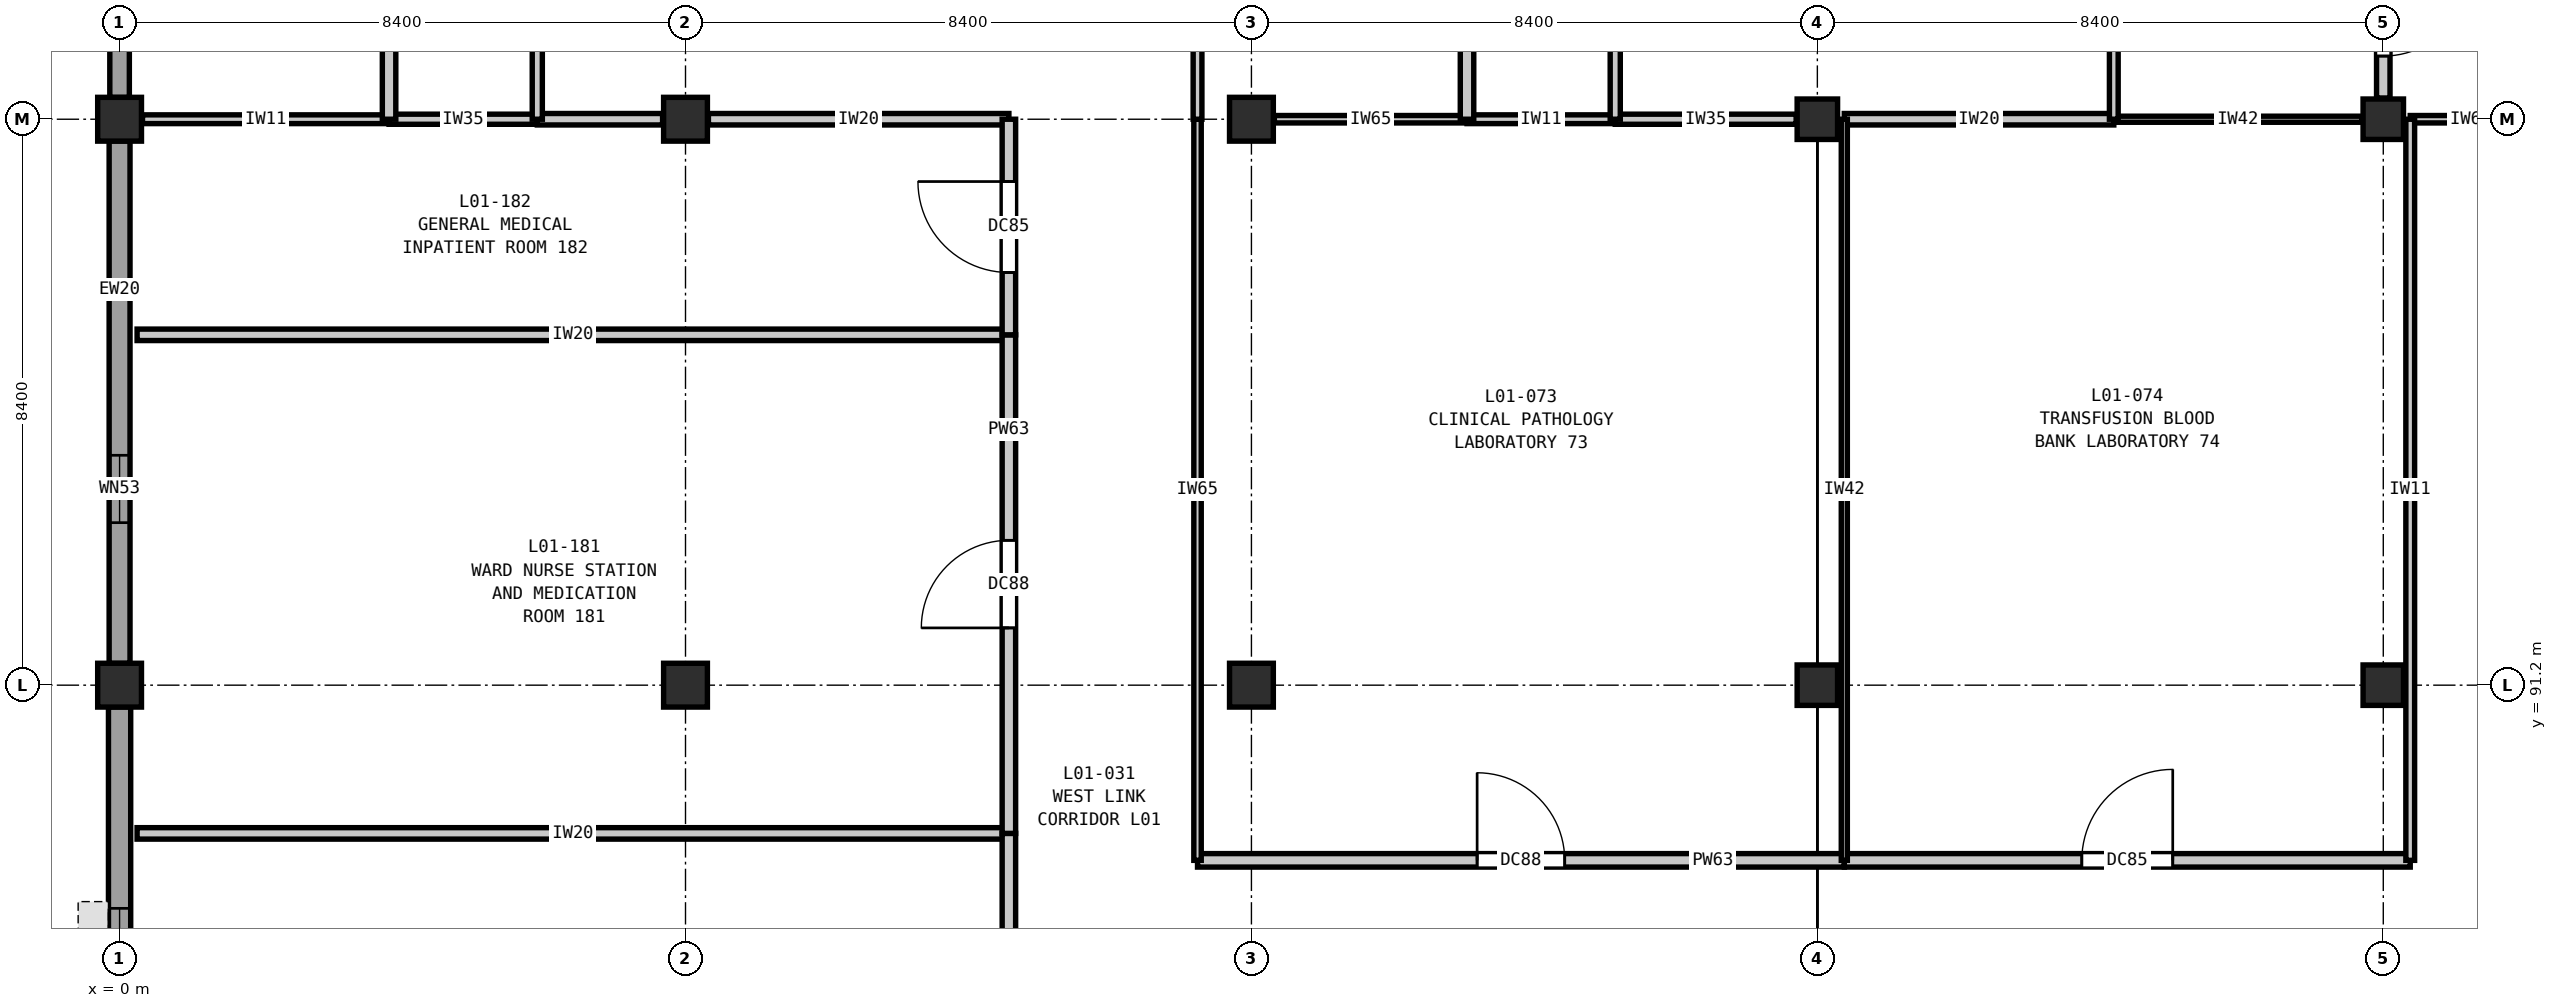
"""IFC4 building model, lengths in metres.
Left out: names, types, materials, properties, quantities, classifications, styles, units other than length and angle.
Written with IfcOpenShell. Run it as: python <this file> out.ifc"""

import sys

from ifc_helpers import new_model, si_unit, direction, frame, frame_2d, origin, origin_2d, place, context, subcontext, project, spatial, rectangle, extrude, element, fill, save


model = new_model("IFC4")
c1 = context("Model", 3, precision=1e-05, world=origin(), true_north=direction((0.0, 1.0)))
c2 = subcontext(c1, "Body", "Model", "MODEL_VIEW")
j1 = project(units=[si_unit("LENGTHUNIT", "METRE"), si_unit("PLANEANGLEUNIT", "RADIAN")], contexts=[c1])
p1 = place(None, origin())
s1 = spatial("IfcSite", under=j1, at=p1, CompositionType="ELEMENT")
p2 = place(p1, origin())
s2 = spatial("IfcBuilding", under=s1, at=p2, CompositionType="ELEMENT")
p3 = place(p2, frame((0.0, 0.0, 5.4)))
s3 = spatial("IfcBuildingStorey", under=s2, at=p3, CompositionType="ELEMENT", Elevation=5.4)
for number, where, z_axis, x_axis in (
    (1, (0.0, 91.2, 0.0), (0.0, 0.0, 1.0), (1.0, 0.0, 0.0)),
    (2, (0.0, 99.6, 0.0), (0.0, 0.0, 1.0), (1.0, 0.0, 0.0)),
    (3, (8.4, 91.2, 0.0), (0.0, 0.0, 1.0), (1.0, 0.0, 0.0)),
    (4, (8.4, 99.6, 0.0), (0.0, 0.0, 1.0), (1.0, 0.0, 0.0)),
    (5, (16.8, 91.2, 0.0), (0.0, 0.0, 1.0), (1.0, 0.0, 0.0)),
    (6, (16.8, 99.6, 0.0), (0.0, 0.0, 1.0), (1.0, 0.0, 0.0)),
):
    element("IfcColumn", number, at=place(p3, frame(where, z_axis=z_axis, x_axis=x_axis)), inside=s3, PredefinedType="COLUMN", context=c2, shape_type="SweptSolid", body=[
        extrude(rectangle(XDim=0.65, YDim=0.65, at=origin_2d()), origin(), (0.0, 0.0, 1.0), 5.4),
    ])
for number, where, z_axis, x_axis in (
    (7, (25.2, 91.2, 0.0), (0.0, 0.0, 1.0), (1.0, 0.0, 0.0)),
    (8, (25.2, 99.6, 0.0), (0.0, 0.0, 1.0), (1.0, 0.0, 0.0)),
    (9, (33.6, 91.2, 0.0), (0.0, 0.0, 1.0), (1.0, 0.0, 0.0)),
    (10, (33.6, 99.6, 0.0), (0.0, 0.0, 1.0), (1.0, 0.0, 0.0)),
):
    element("IfcColumn", number, at=place(p3, frame(where, z_axis=z_axis, x_axis=x_axis)), inside=s3, PredefinedType="COLUMN", context=c2, shape_type="SweptSolid", body=[
        extrude(rectangle(XDim=0.6, YDim=0.6, at=origin_2d()), origin(), (0.0, 0.0, 1.0), 5.4),
    ])
p4 = place(p3, frame((0.0, 83.098, 0.0), z_axis=(0.0, 0.0, 1.0), x_axis=(0.0, 1.0, 0.0)))
e11 = element("IfcWall", 11, at=p4, inside=s3, PredefinedType="SOLIDWALL", context=c2, shape_type="SweptSolid", body=[
    extrude(rectangle(XDim=7.779, YDim=0.33, at=frame_2d((3.89, 0.0))), origin(), (0.0, 0.0, 1.0), 4.68),
])
p5 = place(p4, frame((2.99, 0.0, 0.9)))
e12 = element("IfcOpeningElement", 12, at=p5, cuts=e11, PredefinedType="OPENING", context=c2, shape_type="SweptSolid", body=[
    extrude(rectangle(XDim=1.8, YDim=1.55, at=frame_2d((0.9, 0.775))), frame((0.0, 0.175, 0.0), z_axis=(0.0, -1.0, 0.0), x_axis=(1.0, 0.0, 0.0)), (0.0, 0.0, 1.0), 0.35),
])
p6 = place(p3, frame((0.0, 91.523, 0.0), z_axis=(0.0, 0.0, 1.0), x_axis=(0.0, 1.0, 0.0)))
e13 = element("IfcWall", 13, at=p6, inside=s3, PredefinedType="SOLIDWALL", context=c2, shape_type="SweptSolid", body=[
    extrude(rectangle(XDim=7.754, YDim=0.31, at=frame_2d((3.877, 0.0))), origin(), (0.0, 0.0, 1.0), 4.68),
])
p7 = place(p6, frame((2.089, 0.0, 0.9)))
e14 = element("IfcOpeningElement", 14, at=p7, cuts=e13, PredefinedType="OPENING", context=c2, shape_type="SweptSolid", body=[
    extrude(rectangle(XDim=1.0, YDim=1.75, at=frame_2d((0.5, 0.875))), frame((0.0, 0.165, 0.0), z_axis=(0.0, -1.0, 0.0), x_axis=(1.0, 0.0, 0.0)), (0.0, 0.0, 1.0), 0.33),
])
p8 = place(p3, frame((0.0, 99.923, 0.0), z_axis=(0.0, 0.0, 1.0), x_axis=(0.0, 1.0, 0.0)))
e15 = element("IfcWall", 15, at=p8, inside=s3, PredefinedType="SOLIDWALL", context=c2, shape_type="SweptSolid", body=[
    extrude(rectangle(XDim=2.554, YDim=0.29, at=frame_2d((1.277, 0.0))), origin(), (0.0, 0.0, 1.0), 4.68),
])
p9 = place(p3, frame((16.0, 88.6, 0.0), z_axis=(0.0, 0.0, 1.0), x_axis=(1.0, 0.0, 0.0)))
e16 = element("IfcWall", 16, at=p9, inside=s3, PredefinedType="PARTITIONING", context=c2, shape_type="SweptSolid", body=[
    extrude(rectangle(XDim=9.6, YDim=0.2, at=frame_2d((4.8, 0.0))), origin(), (0.0, 0.0, 1.0), 5.05),
])
p10 = place(p9, frame((4.15, 0.0, 0.0)))
e17 = element("IfcOpeningElement", 17, at=p10, cuts=e16, PredefinedType="OPENING", context=c2, shape_type="SweptSolid", body=[
    extrude(rectangle(XDim=1.3, YDim=2.2, at=frame_2d((0.65, 1.1))), frame((0.0, 0.11, 0.0), z_axis=(0.0, -1.0, 0.0), x_axis=(1.0, 0.0, 0.0)), (0.0, 0.0, 1.0), 0.22),
])
p11 = place(p3, frame((25.6, 88.6, 0.0), z_axis=(0.0, 0.0, 1.0), x_axis=(1.0, 0.0, 0.0)))
e18 = element("IfcWall", 18, at=p11, inside=s3, PredefinedType="PARTITIONING", context=c2, shape_type="SweptSolid", body=[
    extrude(rectangle(XDim=8.4, YDim=0.2, at=frame_2d((4.2, 0.0))), origin(), (0.0, 0.0, 1.0), 5.05),
])
p12 = place(p11, frame((3.525, 0.0, 0.0)))
e19 = element("IfcOpeningElement", 19, at=p12, cuts=e18, PredefinedType="OPENING", context=c2, shape_type="SweptSolid", body=[
    extrude(rectangle(XDim=1.35, YDim=2.2, at=frame_2d((0.675, 1.1))), frame((0.0, 0.11, 0.0), z_axis=(0.0, -1.0, 0.0), x_axis=(1.0, 0.0, 0.0)), (0.0, 0.0, 1.0), 0.22),
])
for number, where, z_axis, x_axis in (
    (20, (0.26, 89.0, 0.0), (0.0, 0.0, 1.0), (1.0, 0.0, 0.0)),
    (21, (0.26, 96.4, 0.0), (0.0, 0.0, 1.0), (1.0, 0.0, 0.0)),
):
    element("IfcWall", number, at=place(p3, frame(where, z_axis=z_axis, x_axis=x_axis)), inside=s3, PredefinedType="PARTITIONING", context=c2, shape_type="SweptSolid", body=[
        extrude(rectangle(XDim=12.94, YDim=0.17, at=frame_2d((6.47, 0.0))), origin(), (0.0, 0.0, 1.0), 5.05),
    ])
p13 = place(p3, frame((0.34, 99.6, 0.0), z_axis=(0.0, 0.0, 1.0), x_axis=(1.0, 0.0, 0.0)))
e22 = element("IfcWall", 22, at=p13, inside=s3, PredefinedType="PARTITIONING", context=c2, shape_type="SweptSolid", body=[
    extrude(rectangle(XDim=3.66, YDim=0.13, at=frame_2d((1.83, 0.0))), origin(), (0.0, 0.0, 1.0), 4.685),
])
p14 = place(p3, frame((4.0, 99.6, 0.0), z_axis=(0.0, 0.0, 1.0), x_axis=(1.0, 0.0, 0.0)))
e23 = element("IfcWall", 23, at=p14, inside=s3, PredefinedType="PARTITIONING", context=c2, shape_type="SweptSolid", body=[
    extrude(rectangle(XDim=2.2, YDim=0.15, at=frame_2d((1.1, 0.0))), origin(), (0.0, 0.0, 1.0), 4.685),
])
p15 = place(p3, frame((8.74, 99.6, 0.0), z_axis=(0.0, 0.0, 1.0), x_axis=(1.0, 0.0, 0.0)))
e24 = element("IfcWall", 24, at=p15, inside=s3, PredefinedType="PARTITIONING", context=c2, shape_type="SweptSolid", body=[
    extrude(rectangle(XDim=4.46, YDim=0.17, at=frame_2d((2.23, 0.0))), origin(), (0.0, 0.0, 1.0), 4.685),
])
p16 = place(p3, frame((6.2, 99.6, 0.0), z_axis=(0.0, 0.0, 1.0), x_axis=(1.0, 0.0, 0.0)))
e25 = element("IfcWall", 25, at=p16, inside=s3, PredefinedType="PARTITIONING", context=c2, shape_type="SweptSolid", body=[
    extrude(rectangle(XDim=1.86, YDim=0.17, at=frame_2d((0.93, 0.0))), origin(), (0.0, 0.0, 1.0), 4.685),
])
p17 = place(p3, frame((17.14, 99.6, 0.0), z_axis=(0.0, 0.0, 1.0), x_axis=(1.0, 0.0, 0.0)))
e26 = element("IfcWall", 26, at=p17, inside=s3, PredefinedType="PARTITIONING", context=c2, shape_type="SweptSolid", body=[
    extrude(rectangle(XDim=2.86, YDim=0.11, at=frame_2d((1.43, 0.0))), origin(), (0.0, 0.0, 1.0), 4.685),
])
p18 = place(p3, frame((20.0, 99.6, 0.0), z_axis=(0.0, 0.0, 1.0), x_axis=(1.0, 0.0, 0.0)))
e27 = element("IfcWall", 27, at=p18, inside=s3, PredefinedType="PARTITIONING", context=c2, shape_type="SweptSolid", body=[
    extrude(rectangle(XDim=2.2, YDim=0.13, at=frame_2d((1.1, 0.0))), origin(), (0.0, 0.0, 1.0), 4.685),
])
p19 = place(p3, frame((22.2, 99.6, 0.0), z_axis=(0.0, 0.0, 1.0), x_axis=(1.0, 0.0, 0.0)))
e28 = element("IfcWall", 28, at=p19, inside=s3, PredefinedType="PARTITIONING", context=c2, shape_type="SweptSolid", body=[
    extrude(rectangle(XDim=2.685, YDim=0.15, at=frame_2d((1.343, 0.0))), origin(), (0.0, 0.0, 1.0), 4.685),
])
p20 = place(p3, frame((25.6, 99.6, 0.0), z_axis=(0.0, 0.0, 1.0), x_axis=(1.0, 0.0, 0.0)))
e29 = element("IfcWall", 29, at=p20, inside=s3, PredefinedType="PARTITIONING", context=c2, shape_type="SweptSolid", body=[
    extrude(rectangle(XDim=4.0, YDim=0.17, at=frame_2d((2.0, 0.0))), origin(), (0.0, 0.0, 1.0), 4.685),
])
p21 = place(p3, frame((29.6, 99.6, 0.0), z_axis=(0.0, 0.0, 1.0), x_axis=(1.0, 0.0, 0.0)))
e30 = element("IfcWall", 30, at=p21, inside=s3, PredefinedType="PARTITIONING", context=c2, shape_type="SweptSolid", body=[
    extrude(rectangle(XDim=3.685, YDim=0.09, at=frame_2d((1.842, 0.0))), origin(), (0.0, 0.0, 1.0), 4.685),
])
p22 = place(p3, frame((34.0, 99.6, 0.0), z_axis=(0.0, 0.0, 1.0), x_axis=(1.0, 0.0, 0.0)))
e31 = element("IfcWall", 31, at=p22, inside=s3, PredefinedType="PARTITIONING", context=c2, shape_type="SweptSolid", body=[
    extrude(rectangle(XDim=1.8, YDim=0.11, at=frame_2d((0.9, 0.0))), origin(), (0.0, 0.0, 1.0), 4.685),
])
p23 = place(p3, frame((4.0, 99.6, 0.0), z_axis=(0.0, 0.0, 1.0), x_axis=(0.0, 1.0, 0.0)))
e32 = element("IfcWall", 32, at=p23, inside=s3, PredefinedType="PARTITIONING", context=c2, shape_type="SweptSolid", body=[
    extrude(rectangle(XDim=6.8, YDim=0.2, at=frame_2d((3.4, 0.0))), origin(), (0.0, 0.0, 1.0), 5.05),
])
p24 = place(p23, frame((2.475, 0.0, 0.0)))
e33 = element("IfcOpeningElement", 33, at=p24, cuts=e32, PredefinedType="OPENING", context=c2, shape_type="SweptSolid", body=[
    extrude(rectangle(XDim=1.85, YDim=2.3, at=frame_2d((0.925, 1.15))), frame((0.0, 0.11, 0.0), z_axis=(0.0, -1.0, 0.0), x_axis=(1.0, 0.0, 0.0)), (0.0, 0.0, 1.0), 0.22),
])
p25 = place(p3, frame((6.2, 99.6, 0.0), z_axis=(0.0, 0.0, 1.0), x_axis=(0.0, 1.0, 0.0)))
e34 = element("IfcWall", 34, at=p25, inside=s3, PredefinedType="PARTITIONING", context=c2, shape_type="SweptSolid", body=[
    extrude(rectangle(XDim=6.8, YDim=0.15, at=frame_2d((3.4, 0.0))), origin(), (0.0, 0.0, 1.0), 5.05),
])
p26 = place(p3, frame((13.2, 82.8, 0.0), z_axis=(0.0, 0.0, 1.0), x_axis=(0.0, 1.0, 0.0)))
e35 = element("IfcWall", 35, at=p26, inside=s3, PredefinedType="PARTITIONING", context=c2, shape_type="SweptSolid", body=[
    extrude(rectangle(XDim=6.2, YDim=0.2, at=frame_2d((3.1, 0.0))), origin(), (0.0, 0.0, 1.0), 5.05),
])
p27 = place(p26, frame((2.475, 0.0, 0.0)))
e36 = element("IfcOpeningElement", 36, at=p27, cuts=e35, PredefinedType="OPENING", context=c2, shape_type="SweptSolid", body=[
    extrude(rectangle(XDim=1.25, YDim=2.15, at=frame_2d((0.625, 1.075))), frame((0.0, 0.11, 0.0), z_axis=(0.0, -1.0, 0.0), x_axis=(1.0, 0.0, 0.0)), (0.0, 0.0, 1.0), 0.22),
])
p28 = place(p3, frame((13.2, 89.0, 0.0), z_axis=(0.0, 0.0, 1.0), x_axis=(0.0, 1.0, 0.0)))
e37 = element("IfcWall", 37, at=p28, inside=s3, PredefinedType="PARTITIONING", context=c2, shape_type="SweptSolid", body=[
    extrude(rectangle(XDim=7.4, YDim=0.2, at=frame_2d((3.7, 0.0))), origin(), (0.0, 0.0, 1.0), 5.05),
])
p29 = place(p28, frame((3.05, 0.0, 0.0)))
e38 = element("IfcOpeningElement", 38, at=p29, cuts=e37, PredefinedType="OPENING", context=c2, shape_type="SweptSolid", body=[
    extrude(rectangle(XDim=1.3, YDim=2.2, at=frame_2d((0.65, 1.1))), frame((0.0, 0.11, 0.0), z_axis=(0.0, -1.0, 0.0), x_axis=(1.0, 0.0, 0.0)), (0.0, 0.0, 1.0), 0.22),
])
p30 = place(p3, frame((13.2, 96.4, 0.0), z_axis=(0.0, 0.0, 1.0), x_axis=(0.0, 1.0, 0.0)))
e39 = element("IfcWall", 39, at=p30, inside=s3, PredefinedType="PARTITIONING", context=c2, shape_type="SweptSolid", body=[
    extrude(rectangle(XDim=3.2, YDim=0.2, at=frame_2d((1.6, 0.0))), origin(), (0.0, 0.0, 1.0), 5.05),
])
p31 = place(p30, frame((0.925, 0.0, 0.0)))
e40 = element("IfcOpeningElement", 40, at=p31, cuts=e39, PredefinedType="OPENING", context=c2, shape_type="SweptSolid", body=[
    extrude(rectangle(XDim=1.35, YDim=2.2, at=frame_2d((0.675, 1.1))), frame((0.0, 0.11, 0.0), z_axis=(0.0, -1.0, 0.0), x_axis=(1.0, 0.0, 0.0)), (0.0, 0.0, 1.0), 0.22),
])
p32 = place(p3, frame((16.0, 88.6, 0.0), z_axis=(0.0, 0.0, 1.0), x_axis=(0.0, 1.0, 0.0)))
e41 = element("IfcWall", 41, at=p32, inside=s3, PredefinedType="PARTITIONING", context=c2, shape_type="SweptSolid", body=[
    extrude(rectangle(XDim=11.0, YDim=0.11, at=frame_2d((5.5, 0.0))), origin(), (0.0, 0.0, 1.0), 5.05),
])
p33 = place(p3, frame((16.0, 99.6, 0.0), z_axis=(0.0, 0.0, 1.0), x_axis=(0.0, 1.0, 0.0)))
e42 = element("IfcWall", 42, at=p33, inside=s3, PredefinedType="PARTITIONING", context=c2, shape_type="SweptSolid", body=[
    extrude(rectangle(XDim=13.6, YDim=0.13, at=frame_2d((6.8, 0.0))), origin(), (0.0, 0.0, 1.0), 5.05),
])
p34 = place(p3, frame((20.0, 99.6, 0.0), z_axis=(0.0, 0.0, 1.0), x_axis=(0.0, 1.0, 0.0)))
e43 = element("IfcWall", 43, at=p34, inside=s3, PredefinedType="PARTITIONING", context=c2, shape_type="SweptSolid", body=[
    extrude(rectangle(XDim=6.8, YDim=0.2, at=frame_2d((3.4, 0.0))), origin(), (0.0, 0.0, 1.0), 5.05),
])
p35 = place(p34, frame((2.725, 0.0, 0.0)))
e44 = element("IfcOpeningElement", 44, at=p35, cuts=e43, PredefinedType="OPENING", context=c2, shape_type="SweptSolid", body=[
    extrude(rectangle(XDim=1.35, YDim=2.2, at=frame_2d((0.675, 1.1))), frame((0.0, 0.11, 0.0), z_axis=(0.0, -1.0, 0.0), x_axis=(1.0, 0.0, 0.0)), (0.0, 0.0, 1.0), 0.22),
])
p36 = place(p3, frame((22.2, 99.6, 0.0), z_axis=(0.0, 0.0, 1.0), x_axis=(0.0, 1.0, 0.0)))
e45 = element("IfcWall", 45, at=p36, inside=s3, PredefinedType="PARTITIONING", context=c2, shape_type="SweptSolid", body=[
    extrude(rectangle(XDim=6.8, YDim=0.15, at=frame_2d((3.4, 0.0))), origin(), (0.0, 0.0, 1.0), 5.05),
])
p37 = place(p3, frame((25.6, 88.6, 0.0), z_axis=(0.0, 0.0, 1.0), x_axis=(0.0, 1.0, 0.0)))
e46 = element("IfcWall", 46, at=p37, inside=s3, PredefinedType="PARTITIONING", context=c2, shape_type="SweptSolid", body=[
    extrude(rectangle(XDim=11.0, YDim=0.09, at=frame_2d((5.5, 0.0))), origin(), (0.0, 0.0, 1.0), 5.05),
])
p38 = place(p3, frame((29.6, 99.6, 0.0), z_axis=(0.0, 0.0, 1.0), x_axis=(0.0, 1.0, 0.0)))
e47 = element("IfcWall", 47, at=p38, inside=s3, PredefinedType="PARTITIONING", context=c2, shape_type="SweptSolid", body=[
    extrude(rectangle(XDim=13.6, YDim=0.13, at=frame_2d((6.8, 0.0))), origin(), (0.0, 0.0, 1.0), 5.05),
])
p39 = place(p3, frame((33.6, 99.915, 0.0), z_axis=(0.0, 0.0, 1.0), x_axis=(0.0, 1.0, 0.0)))
e48 = element("IfcWall", 48, at=p39, inside=s3, PredefinedType="PARTITIONING", context=c2, shape_type="SweptSolid", body=[
    extrude(rectangle(XDim=2.545, YDim=0.2, at=frame_2d((1.272, 0.0))), origin(), (0.0, 0.0, 1.0), 4.735),
])
p40 = place(p39, frame((0.623, 0.0, 0.0)))
e49 = element("IfcOpeningElement", 49, at=p40, cuts=e48, PredefinedType="OPENING", context=c2, shape_type="SweptSolid", body=[
    extrude(rectangle(XDim=1.3, YDim=2.2, at=frame_2d((0.65, 1.1))), frame((0.0, 0.11, 0.0), z_axis=(0.0, -1.0, 0.0), x_axis=(1.0, 0.0, 0.0)), (0.0, 0.0, 1.0), 0.22),
])
p41 = place(p3, frame((34.0, 88.6, 0.0), z_axis=(0.0, 0.0, 1.0), x_axis=(0.0, 1.0, 0.0)))
e50 = element("IfcWall", 50, at=p41, inside=s3, PredefinedType="PARTITIONING", context=c2, shape_type="SweptSolid", body=[
    extrude(rectangle(XDim=11.0, YDim=0.13, at=frame_2d((5.5, 0.0))), origin(), (0.0, 0.0, 1.0), 5.05),
])
p42 = place(p5, origin())
e51 = element("IfcWindow", 51, at=p42, inside=s3, PartitioningType="DOUBLE_PANEL_VERTICAL", PredefinedType="WINDOW", context=c2, shape_type="SweptSolid", body=[
    extrude(rectangle(XDim=1.8, YDim=1.55, at=frame_2d((0.9, 0.775))), frame((0.0, 0.03, 0.0), z_axis=(0.0, -1.0, 0.0), x_axis=(1.0, 0.0, 0.0)), (0.0, 0.0, 1.0), 0.06),
])
fill(e12, e51)
p43 = place(p7, origin())
e52 = element("IfcWindow", 52, at=p43, inside=s3, PartitioningType="SINGLE_PANEL", PredefinedType="WINDOW", context=c2, shape_type="SweptSolid", body=[
    extrude(rectangle(XDim=1.0, YDim=1.75, at=frame_2d((0.5, 0.875))), frame((0.0, 0.03, 0.0), z_axis=(0.0, -1.0, 0.0), x_axis=(1.0, 0.0, 0.0)), (0.0, 0.0, 1.0), 0.06),
])
fill(e14, e52)
p44 = place(p10, origin())
e53 = element("IfcDoor", 53, at=p44, inside=s3, OperationType="SINGLE_SWING_LEFT", PredefinedType="DOOR", context=c2, shape_type="SweptSolid", body=[
    extrude(rectangle(XDim=1.3, YDim=2.2, at=frame_2d((0.65, 1.1))), frame((0.0, 0.025, 0.0), z_axis=(0.0, -1.0, 0.0), x_axis=(1.0, 0.0, 0.0)), (0.0, 0.0, 1.0), 0.05),
])
fill(e17, e53)
p45 = place(p12, origin())
e54 = element("IfcDoor", 54, at=p45, inside=s3, OperationType="SINGLE_SWING_RIGHT", PredefinedType="DOOR", context=c2, shape_type="SweptSolid", body=[
    extrude(rectangle(XDim=1.35, YDim=2.2, at=frame_2d((0.675, 1.1))), frame((0.0, 0.025, 0.0), z_axis=(0.0, -1.0, 0.0), x_axis=(1.0, 0.0, 0.0)), (0.0, 0.0, 1.0), 0.05),
])
fill(e19, e54)
p46 = place(p29, origin())
e55 = element("IfcDoor", 55, at=p46, inside=s3, OperationType="SINGLE_SWING_LEFT", PredefinedType="DOOR", context=c2, shape_type="SweptSolid", body=[
    extrude(rectangle(XDim=1.3, YDim=2.2, at=frame_2d((0.65, 1.1))), frame((0.0, 0.025, 0.0), z_axis=(0.0, -1.0, 0.0), x_axis=(1.0, 0.0, 0.0)), (0.0, 0.0, 1.0), 0.05),
])
fill(e38, e55)
p47 = place(p31, origin())
e56 = element("IfcDoor", 56, at=p47, inside=s3, OperationType="SINGLE_SWING_RIGHT", PredefinedType="DOOR", context=c2, shape_type="SweptSolid", body=[
    extrude(rectangle(XDim=1.35, YDim=2.2, at=frame_2d((0.675, 1.1))), frame((0.0, 0.025, 0.0), z_axis=(0.0, -1.0, 0.0), x_axis=(1.0, 0.0, 0.0)), (0.0, 0.0, 1.0), 0.05),
])
fill(e40, e56)
p48 = place(p40, frame((1.3, 0.0, 0.0), z_axis=(0.0, 0.0, 1.0), x_axis=(-1.0, 0.0, 0.0)))
e57 = element("IfcDoor", 57, at=p48, inside=s3, OperationType="SINGLE_SWING_LEFT", PredefinedType="DOOR", context=c2, shape_type="SweptSolid", body=[
    extrude(rectangle(XDim=1.3, YDim=2.2, at=frame_2d((0.65, 1.1))), frame((0.0, 0.025, 0.0), z_axis=(0.0, -1.0, 0.0), x_axis=(1.0, 0.0, 0.0)), (0.0, 0.0, 1.0), 0.05),
])
fill(e49, e57)
save(model, sys.argv[1])
